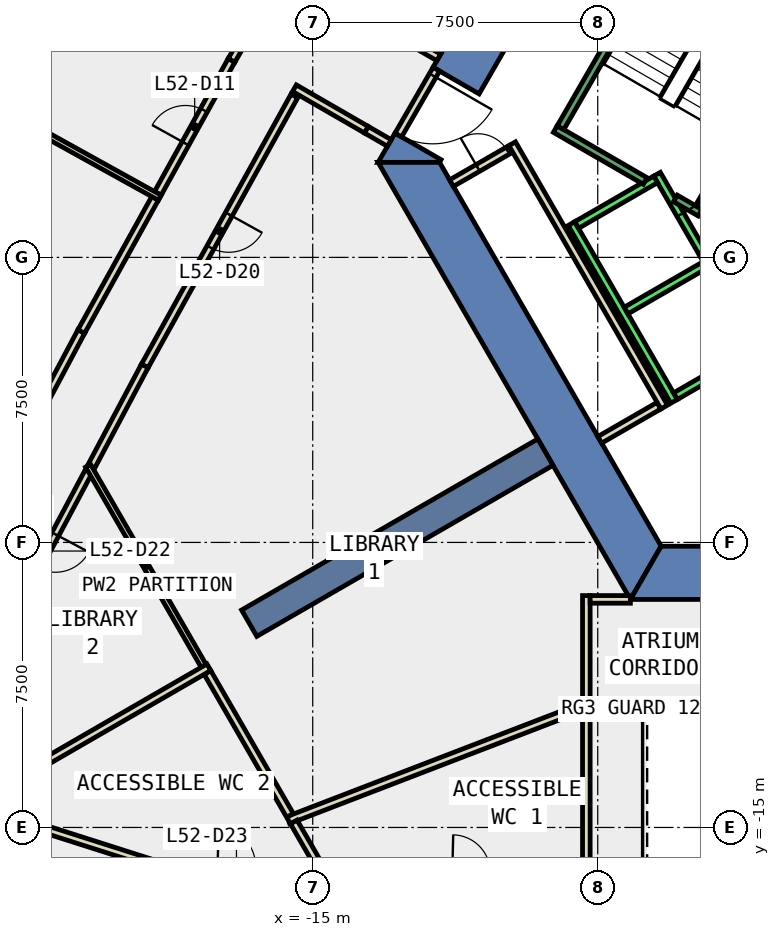
"""IFC4 building model, lengths in metres.
Left out: names, types, materials, properties, quantities, classifications, styles, units other than length and angle.
Written with IfcOpenShell. Run it as: python <this file> out.ifc"""

import sys

from ifc_helpers import new_model, si_unit, direction, frame, frame_2d, origin, place, context, subcontext, project, spatial, polyline, rectangle, outline, extrude, element, fill, save


model = new_model("IFC4")
c1 = context("Model", 3, precision=1e-05, world=origin(), true_north=direction((0.0, 1.0)))
c2 = subcontext(c1, "Body", "Model", "MODEL_VIEW")
j1 = project(units=[si_unit("LENGTHUNIT", "METRE"), si_unit("PLANEANGLEUNIT", "RADIAN")], contexts=[c1])
p1 = place(None, origin())
s1 = spatial("IfcSite", under=j1, at=p1, CompositionType="ELEMENT")
p2 = place(p1, origin())
s2 = spatial("IfcBuilding", under=s1, at=p2, CompositionType="ELEMENT")
p3 = place(p2, frame((0.0, 0.0, 231.8)))
s3 = spatial("IfcBuildingStorey", under=s2, at=p3, CompositionType="ELEMENT", Elevation=231.8)
p4 = place(p3, frame((0.0, 0.0, -0.4)))
e1 = element("IfcWall", 1, at=p4, inside=s3, PredefinedType="SHEAR", context=c2, shape_type="SweptSolid", body=[
    extrude(outline(polyline([(-11.834, 5.002), (-10.622, 4.302), (-5.831, 12.6), (-6.64, 14.0), (-11.834, 5.002)])), origin(), (0.0, 0.0, 1.0), 4.0),
])
p5 = place(p3, frame((0.0, 0.0, -0.4)))
e2 = element("IfcWall", 2, at=p5, inside=s3, PredefinedType="SHEAR", context=c2, shape_type="SweptSolid", body=[
    extrude(outline(polyline([(-11.622, 2.57), (-12.834, 3.27), (-13.279, 2.5), (-11.662, 2.5), (-11.622, 2.57)])), origin(), (0.0, 0.0, 1.0), 4.0),
])
p6 = place(p3, frame((0.0, 0.0, -0.4)))
e3 = element("IfcWall", 3, at=p6, inside=s3, PredefinedType="SHEAR", context=c2, shape_type="SweptSolid", body=[
    extrude(outline(polyline([(-13.279, 2.5), (-6.64, -9.0), (-5.831, -7.6), (-11.662, 2.5), (-13.279, 2.5)])), origin(), (0.0, 0.0, 1.0), 4.0),
])
p7 = place(p3, frame((0.0, 0.0, -0.4)))
e4 = element("IfcWall", 4, at=p7, inside=s3, PredefinedType="SHEAR", context=c2, shape_type="SweptSolid", body=[
    extrude(outline(polyline([(3.75, -9.0), (3.75, -7.6), (-5.831, -7.6), (-6.64, -9.0), (3.75, -9.0)])), origin(), (0.0, 0.0, 1.0), 4.0),
])
p8 = place(p3, frame((-8.877, -5.125, -0.4), z_axis=(0.0, 0.0, 1.0), x_axis=(-0.866017533419, -0.500013631625, 0.0)))
e5 = element("IfcWall", 5, at=p8, inside=s3, PredefinedType="SHEAR", context=c2, shape_type="SweptSolid", body=[
    extrude(rectangle(XDim=9.0, YDim=0.8, at=frame_2d((4.5, 0.0))), origin(), (0.0, 0.0, 1.0), 4.0),
])
p9 = place(p3, frame((-15.482, 4.249, 0.0), z_axis=(0.0, 0.0, 1.0), x_axis=(-0.484683114876, -0.874689818252, 0.0)))
e6 = element("IfcWall", 6, at=p9, inside=s3, PredefinedType="PARTITIONING", context=c2, shape_type="SweptSolid", body=[
    extrude(rectangle(XDim=8.123, YDim=0.2, at=frame_2d((4.062, 0.0))), origin(), (0.0, 0.0, 1.0), 3.6),
])
p10 = place(p9, frame((3.561, 0.0, 0.0)))
e7 = element("IfcOpeningElement", 7, at=p10, cuts=e6, PredefinedType="OPENING", context=c2, shape_type="SweptSolid", body=[
    extrude(rectangle(XDim=1.0, YDim=2.1, at=frame_2d((0.5, 1.05))), frame((0.0, 0.11, 0.0), z_axis=(0.0, -1.0, 0.0), x_axis=(1.0, 0.0, 0.0)), (0.0, 0.0, 1.0), 0.22),
])
p11 = place(p3, frame((-19.419, -2.856, 0.0), z_axis=(0.0, 0.0, 1.0), x_axis=(-0.469627838973, -0.882864481595, 0.0)))
e8 = element("IfcWall", 8, at=p11, inside=s3, PredefinedType="PARTITIONING", context=c2, shape_type="SweptSolid", body=[
    extrude(rectangle(XDim=2.996, YDim=0.2, at=frame_2d((1.498, 0.0))), origin(), (0.0, 0.0, 1.0), 3.6),
])
p12 = place(p3, frame((-12.984, 3.01, 0.0), z_axis=(0.0, 0.0, 1.0), x_axis=(-0.865959057869, 0.500114896893, 0.0)))
e9 = element("IfcWall", 9, at=p12, inside=s3, PredefinedType="PARTITIONING", context=c2, shape_type="SweptSolid", body=[
    extrude(rectangle(XDim=0.7, YDim=0.2, at=frame_2d((0.35, 0.0))), origin(), (0.0, 0.0, 1.0), 2.4),
])
p13 = place(p3, frame((-20.896, -5.634, 0.0), z_axis=(0.0, 0.0, 1.0), x_axis=(-0.469448951755, -0.882959614986, 0.0)))
e10 = element("IfcWall", 10, at=p13, inside=s3, PredefinedType="PARTITIONING", context=c2, shape_type="SweptSolid", body=[
    extrude(rectangle(XDim=4.74, YDim=0.2, at=frame_2d((2.37, 0.0))), origin(), (0.0, 0.0, 1.0), 3.6),
])
p14 = place(p13, frame((1.87, 0.0, 0.0)))
e11 = element("IfcOpeningElement", 11, at=p14, cuts=e10, PredefinedType="OPENING", context=c2, shape_type="SweptSolid", body=[
    extrude(rectangle(XDim=1.0, YDim=2.1, at=frame_2d((0.5, 1.05))), frame((0.0, 0.11, 0.0), z_axis=(0.0, -1.0, 0.0), x_axis=(1.0, 0.0, 0.0)), (0.0, 0.0, 1.0), 0.22),
])
p15 = place(p3, frame((-22.435, -14.92, 0.0), z_axis=(0.0, 0.0, 1.0), x_axis=(0.952831275662, -0.303500510906, 0.0)))
e12 = element("IfcWall", 12, at=p15, inside=s3, PredefinedType="PARTITIONING", context=c2, shape_type="SweptSolid", body=[
    extrude(rectangle(XDim=3.259, YDim=0.2, at=frame_2d((1.629, 0.0))), origin(), (0.0, 0.0, 1.0), 3.6),
])
p16 = place(p3, frame((-19.076, 1.684, 0.0), z_axis=(0.0, 0.0, 1.0), x_axis=(0.484679349661, 0.874691904623, 0.0)))
e13 = element("IfcWall", 13, at=p16, inside=s3, PredefinedType="PARTITIONING", context=c2, shape_type="SweptSolid", body=[
    extrude(rectangle(XDim=4.002, YDim=0.2, at=frame_2d((2.001, 0.0))), origin(), (0.0, 0.0, 1.0), 3.6),
])
p17 = place(p16, frame((1.501, 0.0, 0.0)))
e14 = element("IfcOpeningElement", 14, at=p17, cuts=e13, PredefinedType="OPENING", context=c2, shape_type="SweptSolid", body=[
    extrude(rectangle(XDim=1.0, YDim=2.1, at=frame_2d((0.5, 1.05))), frame((0.0, 0.11, 0.0), z_axis=(0.0, -1.0, 0.0), x_axis=(1.0, 0.0, 0.0)), (0.0, 0.0, 1.0), 0.22),
])
p18 = place(p3, frame((-17.136, 5.185, 0.0), z_axis=(0.0, 0.0, 1.0), x_axis=(0.500102734445, 0.865966081899, 0.0)))
e15 = element("IfcWall", 15, at=p18, inside=s3, PredefinedType="PARTITIONING", context=c2, shape_type="SweptSolid", body=[
    extrude(rectangle(XDim=4.001, YDim=0.2, at=frame_2d((2.0, 0.0))), origin(), (0.0, 0.0, 1.0), 3.6),
])
p19 = place(p3, frame((-24.866, -9.053, 0.0), z_axis=(0.0, 0.0, 1.0), x_axis=(0.469431794586, 0.882968736837, 0.0)))
e16 = element("IfcWall", 16, at=p19, inside=s3, PredefinedType="PARTITIONING", context=c2, shape_type="SweptSolid", body=[
    extrude(rectangle(XDim=8.046, YDim=0.2, at=frame_2d((4.023, 0.0))), origin(), (0.0, 0.0, 1.0), 3.6),
])
p20 = place(p19, frame((3.522, 0.0, 0.0)))
e17 = element("IfcOpeningElement", 17, at=p20, cuts=e16, PredefinedType="OPENING", context=c2, shape_type="SweptSolid", body=[
    extrude(rectangle(XDim=1.0, YDim=2.1, at=frame_2d((0.5, 1.05))), frame((0.0, 0.11, 0.0), z_axis=(0.0, -1.0, 0.0), x_axis=(1.0, 0.0, 0.0)), (0.0, 0.0, 1.0), 0.22),
])
p21 = place(p3, frame((-21.089, -1.949, 0.0), z_axis=(0.0, 0.0, 1.0), x_axis=(0.484622593188, 0.874723351793, 0.0)))
e18 = element("IfcWall", 18, at=p21, inside=s3, PredefinedType="PARTITIONING", context=c2, shape_type="SweptSolid", body=[
    extrude(rectangle(XDim=4.003, YDim=0.2, at=frame_2d((2.002, 0.0))), origin(), (0.0, 0.0, 1.0), 3.6),
])
p22 = place(p3, frame((-5.888, -3.902, 0.0), z_axis=(0.0, 0.0, 1.0), x_axis=(-0.866316547501, -0.499495384889, 0.0)))
e19 = element("IfcWall", 19, at=p22, inside=s3, PredefinedType="PARTITIONING", context=c2, shape_type="SweptSolid", body=[
    extrude(rectangle(XDim=1.8, YDim=0.2, at=frame_2d((0.9, 0.0))), origin(), (0.0, 0.0, 1.0), 3.6),
])
p23 = place(p3, frame((-11.347, 1.954, 0.0), z_axis=(0.0, 0.0, 1.0), x_axis=(0.866282695276, 0.499554093032, 0.0)))
e20 = element("IfcWall", 20, at=p23, inside=s3, PredefinedType="PARTITIONING", context=c2, shape_type="SweptSolid", body=[
    extrude(rectangle(XDim=1.8, YDim=0.2, at=frame_2d((0.9, 0.0))), origin(), (0.0, 0.0, 1.0), 3.6),
])
p24 = place(p23, frame((0.8, 0.0, 0.0)))
e21 = element("IfcOpeningElement", 21, at=p24, cuts=e20, PredefinedType="OPENING", context=c2, shape_type="SweptSolid", body=[
    extrude(rectangle(XDim=0.9, YDim=2.1, at=frame_2d((0.45, 1.05))), frame((0.0, 0.11, 0.0), z_axis=(0.0, -1.0, 0.0), x_axis=(1.0, 0.0, 0.0)), (0.0, 0.0, 1.0), 0.22),
])
p25 = place(p3, frame((-9.751, 2.99, 0.0), z_axis=(0.0, 0.0, 1.0), x_axis=(0.500012163284, -0.866018381195, 0.0)))
e22 = element("IfcWall", 22, at=p25, inside=s3, PredefinedType="PARTITIONING", context=c2, shape_type="SweptSolid", body=[
    extrude(rectangle(XDim=8.0, YDim=0.2, at=frame_2d((4.0, 0.0))), origin(), (0.0, 0.0, 1.0), 3.6),
])
p26 = place(p3, frame((-7.8, -11.69, 0.0), z_axis=(0.0, 0.0, 1.0), x_axis=(0.0, 1.0, 0.0)))
e23 = element("IfcWall", 23, at=p26, inside=s3, PredefinedType="PARTITIONING", context=c2, shape_type="SweptSolid", body=[
    extrude(rectangle(XDim=2.791, YDim=0.2, at=frame_2d((1.396, 0.0))), origin(), (0.0, 0.0, 1.0), 3.6),
])
p27 = place(p3, frame((-7.7, -8.999, 0.0), z_axis=(0.0, 0.0, 1.0), x_axis=(1.0, 0.0, 0.0)))
e24 = element("IfcWall", 24, at=p27, inside=s3, PredefinedType="PARTITIONING", context=c2, shape_type="SweptSolid", body=[
    extrude(rectangle(XDim=1.059, YDim=0.2, at=frame_2d((0.529, 0.0))), origin(), (0.0, 0.0, 1.0), 3.6),
])
p28 = place(p3, frame((-7.8, -16.176, 0.0), z_axis=(0.0, 0.0, 1.0), x_axis=(0.0, 1.0, 0.0)))
e25 = element("IfcWall", 25, at=p28, inside=s3, PredefinedType="PARTITIONING", context=c2, shape_type="SweptSolid", body=[
    extrude(rectangle(XDim=4.286, YDim=0.2, at=frame_2d((2.143, 0.0))), origin(), (0.0, 0.0, 1.0), 3.6),
])
p29 = place(p3, frame((-7.707, -11.755, 0.0), z_axis=(0.0, 0.0, 1.0), x_axis=(-0.933420343818, -0.358784701105, 0.0)))
e26 = element("IfcWall", 26, at=p29, inside=s3, PredefinedType="PARTITIONING", context=c2, shape_type="SweptSolid", body=[
    extrude(rectangle(XDim=8.501, YDim=0.2, at=frame_2d((4.25, 0.0))), origin(), (0.0, 0.0, 1.0), 3.6),
])
p30 = place(p3, frame((-17.87, -10.749, 0.0), z_axis=(0.0, 0.0, 1.0), x_axis=(-0.499907758807, 0.866078652713, 0.0)))
e27 = element("IfcWall", 27, at=p30, inside=s3, PredefinedType="PARTITIONING", context=c2, shape_type="SweptSolid", body=[
    extrude(rectangle(XDim=6.083, YDim=0.15, at=frame_2d((3.042, 0.0))), origin(), (0.0, 0.0, 1.0), 3.6),
])
p31 = place(p3, frame((-15.599, -14.682, 0.0), z_axis=(0.0, 0.0, 1.0), x_axis=(-0.500033987016, 0.866005780482, 0.0)))
e28 = element("IfcWall", 28, at=p31, inside=s3, PredefinedType="PARTITIONING", context=c2, shape_type="SweptSolid", body=[
    extrude(rectangle(XDim=4.342, YDim=0.2, at=frame_2d((2.171, 0.0))), origin(), (0.0, 0.0, 1.0), 3.6),
])
p32 = place(p3, frame((-14.778, -16.103, 0.0), z_axis=(0.0, 0.0, 1.0), x_axis=(-0.500495009846, 0.865739421027, 0.0)))
e29 = element("IfcWall", 29, at=p32, inside=s3, PredefinedType="PARTITIONING", context=c2, shape_type="SweptSolid", body=[
    extrude(rectangle(XDim=1.44, YDim=0.2, at=frame_2d((0.72, 0.0))), origin(), (0.0, 0.0, 1.0), 3.6),
])
p33 = place(p3, frame((-17.733, -10.785, 0.0), z_axis=(0.0, 0.0, 1.0), x_axis=(-0.865978611197, -0.500081038382, 0.0)))
e30 = element("IfcWall", 30, at=p33, inside=s3, PredefinedType="PARTITIONING", context=c2, shape_type="SweptSolid", body=[
    extrude(rectangle(XDim=6.581, YDim=0.2, at=frame_2d((3.291, 0.0))), origin(), (0.0, 0.0, 1.0), 3.6),
])
p34 = place(p3, frame((-19.025, 1.57, 0.0), z_axis=(0.0, 0.0, 1.0), x_axis=(-0.874714019242, 0.484639437666, 0.0)))
e31 = element("IfcWall", 31, at=p34, inside=s3, PredefinedType="PARTITIONING", context=c2, shape_type="SweptSolid", body=[
    extrude(rectangle(XDim=5.6, YDim=0.15, at=frame_2d((2.8, 0.0))), origin(), (0.0, 0.0, 1.0), 3.6),
])
p35 = place(p3, frame((-11.747, 4.952, 0.0), z_axis=(0.0, 0.0, 1.0), x_axis=(-0.50002537861, -0.866010750942, 0.0)))
e32 = element("IfcWall", 32, at=p35, inside=s3, PredefinedType="PARTITIONING", context=c2, shape_type="SweptSolid", body=[
    extrude(rectangle(XDim=2.0, YDim=0.2, at=frame_2d((1.0, 0.0))), origin(), (0.0, 0.0, 1.0), 2.4),
])
p36 = place(p35, frame((0.19, 0.0, 0.0)))
e33 = element("IfcOpeningElement", 33, at=p36, cuts=e32, PredefinedType="OPENING", context=c2, shape_type="SweptSolid", body=[
    extrude(rectangle(XDim=1.8, YDim=2.1, at=frame_2d((0.9, 1.05))), frame((0.0, 0.11, 0.0), z_axis=(0.0, -1.0, 0.0), x_axis=(1.0, 0.0, 0.0)), (0.0, 0.0, 1.0), 0.22),
])
p37 = place(p3, frame((-12.29, 5.612, 0.0), z_axis=(0.0, 0.0, 1.0), x_axis=(0.865871789474, -0.500265973451, 0.0)))
e34 = element("IfcWall", 34, at=p37, inside=s3, PredefinedType="PARTITIONING", context=c2, shape_type="SweptSolid", body=[
    extrude(rectangle(XDim=0.7, YDim=0.2, at=frame_2d((0.35, 0.0))), origin(), (0.0, 0.0, 1.0), 2.4),
])
p38 = place(p3, frame((-13.59, 3.36, 0.0), z_axis=(0.0, 0.0, 1.0), x_axis=(-0.866004963011, 0.500035402787, 0.0)))
e35 = element("IfcWall", 35, at=p38, inside=s3, PredefinedType="PARTITIONING", context=c2, shape_type="SweptSolid", body=[
    extrude(rectangle(XDim=2.183, YDim=0.2, at=frame_2d((1.092, 0.0))), origin(), (0.0, 0.0, 1.0), 3.6),
])
p39 = place(p3, frame((-5.94, 2.188, 0.0), z_axis=(0.0, 0.0, 1.0), x_axis=(0.500034260056, -0.866005622828, 0.0)))
e36 = element("IfcWall", 36, at=p39, inside=s3, PredefinedType="STANDARD", context=c2, shape_type="SweptSolid", body=[
    extrude(rectangle(XDim=5.399, YDim=0.2, at=frame_2d((2.7, 0.0))), origin(), (0.0, 0.0, 1.0), 3.6),
])
p40 = place(p39, frame((3.075, 0.0, 0.0)))
e37 = element("IfcOpeningElement", 37, at=p40, cuts=e36, PredefinedType="OPENING", context=c2, shape_type="SweptSolid", body=[
    extrude(rectangle(XDim=1.1, YDim=2.1, at=frame_2d((0.55, 1.05))), frame((0.0, 0.11, 0.0), z_axis=(0.0, -1.0, 0.0), x_axis=(1.0, 0.0, 0.0)), (0.0, 0.0, 1.0), 0.22),
])
p41 = place(p39, frame((1.225, 0.0, 0.0)))
e38 = element("IfcOpeningElement", 38, at=p41, cuts=e36, PredefinedType="OPENING", context=c2, shape_type="SweptSolid", body=[
    extrude(rectangle(XDim=1.1, YDim=2.1, at=frame_2d((0.55, 1.05))), frame((0.0, 0.11, 0.0), z_axis=(0.0, -1.0, 0.0), x_axis=(1.0, 0.0, 0.0)), (0.0, 0.0, 1.0), 0.22),
])
p42 = place(p3, frame((-8.192, 0.888, 0.0), z_axis=(0.0, 0.0, 1.0), x_axis=(0.500034260056, -0.866005622828, 0.0)))
e39 = element("IfcWall", 39, at=p42, inside=s3, PredefinedType="STANDARD", context=c2, shape_type="SweptSolid", body=[
    extrude(rectangle(XDim=5.399, YDim=0.2, at=frame_2d((2.7, 0.0))), origin(), (0.0, 0.0, 1.0), 3.6),
])
for number, where, z_axis, x_axis in (
    (40, (-5.977, 2.052, 0.0), (0.0, 0.0, 1.0), (-0.866, -0.5, 0.0)),
    (41, (-4.677, -0.2, 0.0), (0.0, 0.0, 1.0), (-0.866, -0.5, 0.0)),
):
    element("IfcWall", number, at=place(p3, frame(where, z_axis=z_axis, x_axis=x_axis)), inside=s3, PredefinedType="STANDARD", context=c2, shape_type="SweptSolid", body=[
        extrude(rectangle(XDim=2.399, YDim=0.2, at=frame_2d((1.2, 0.0))), origin(), (0.0, 0.0, 1.0), 3.6),
    ])
p43 = place(p3, frame((-3.377, -2.452, 0.0), z_axis=(0.0, 0.0, 1.0), x_axis=(-0.865955154139, -0.50012165622, 0.0)))
e42 = element("IfcWall", 42, at=p43, inside=s3, PredefinedType="STANDARD", context=c2, shape_type="SweptSolid", body=[
    extrude(rectangle(XDim=2.4, YDim=0.2, at=frame_2d((1.2, 0.0))), origin(), (0.0, 0.0, 1.0), 3.6),
])
p44 = place(p3, frame((-6.25, 2.01, 0.0), z_axis=(0.0, 0.0, 1.0), x_axis=(-0.86611865017, 0.499838457731, 0.0)))
e43 = element("IfcWall", 43, at=p44, inside=s3, PredefinedType="STANDARD", context=c2, shape_type="SweptSolid", body=[
    extrude(rectangle(XDim=2.733, YDim=0.2, at=frame_2d((1.366, 0.0))), origin(), (0.0, 0.0, 1.0), 3.6),
])
p45 = place(p3, frame((-4.806, 1.176, 0.0), z_axis=(0.0, 0.0, 1.0), x_axis=(-0.866558586415, 0.499075361355, 0.0)))
e44 = element("IfcWall", 44, at=p45, inside=s3, PredefinedType="STANDARD", context=c2, shape_type="SweptSolid", body=[
    extrude(rectangle(XDim=0.751, YDim=0.2, at=frame_2d((0.376, 0.0))), origin(), (0.0, 0.0, 1.0), 3.6),
])
p46 = place(p3, frame((-1.393, 7.288, 0.0), z_axis=(0.0, 0.0, 1.0), x_axis=(-0.499963383562, -0.866046543262, 0.0)))
e45 = element("IfcWall", 45, at=p46, inside=s3, PredefinedType="STANDARD", context=c2, shape_type="SweptSolid", body=[
    extrude(rectangle(XDim=6.9, YDim=0.2, at=frame_2d((3.45, 0.0))), origin(), (0.0, 0.0, 1.0), 3.6),
])
p47 = place(p46, frame((0.45, 0.0, 0.0)))
e46 = element("IfcOpeningElement", 46, at=p47, cuts=e45, PredefinedType="OPENING", context=c2, shape_type="SweptSolid", body=[
    extrude(rectangle(XDim=1.1, YDim=2.2, at=frame_2d((0.55, 1.1))), frame((0.0, 0.11, 0.0), z_axis=(0.0, -1.0, 0.0), x_axis=(1.0, 0.0, 0.0)), (0.0, 0.0, 1.0), 0.22),
])
p48 = place(p3, frame((-5.03, 9.388, 0.0), z_axis=(0.0, 0.0, 1.0), x_axis=(-0.499978703459, -0.866037698999, 0.0)))
e47 = element("IfcWall", 47, at=p48, inside=s3, PredefinedType="STANDARD", context=c2, shape_type="SweptSolid", body=[
    extrude(rectangle(XDim=6.9, YDim=0.2, at=frame_2d((3.45, 0.0))), origin(), (0.0, 0.0, 1.0), 3.6),
])
p49 = place(p17, origin())
e48 = element("IfcDoor", 48, at=p49, inside=s3, OperationType="SINGLE_SWING_LEFT", PredefinedType="DOOR", context=c2, shape_type="SweptSolid", body=[
    extrude(rectangle(XDim=1.0, YDim=2.1, at=frame_2d((0.5, 1.05))), frame((0.0, 0.025, 0.0), z_axis=(0.0, -1.0, 0.0), x_axis=(1.0, 0.0, 0.0)), (0.0, 0.0, 1.0), 0.05),
])
fill(e14, e48)
p50 = place(p10, origin())
e49 = element("IfcDoor", 49, at=p50, inside=s3, OperationType="SINGLE_SWING_LEFT", PredefinedType="DOOR", context=c2, shape_type="SweptSolid", body=[
    extrude(rectangle(XDim=1.0, YDim=2.1, at=frame_2d((0.5, 1.05))), frame((0.0, 0.025, 0.0), z_axis=(0.0, -1.0, 0.0), x_axis=(1.0, 0.0, 0.0)), (0.0, 0.0, 1.0), 0.05),
])
fill(e7, e49)
p51 = place(p14, origin())
e50 = element("IfcDoor", 50, at=p51, inside=s3, OperationType="SINGLE_SWING_LEFT", PredefinedType="DOOR", context=c2, shape_type="SweptSolid", body=[
    extrude(rectangle(XDim=1.0, YDim=2.1, at=frame_2d((0.5, 1.05))), frame((0.0, 0.025, 0.0), z_axis=(0.0, -1.0, 0.0), x_axis=(1.0, 0.0, 0.0)), (0.0, 0.0, 1.0), 0.05),
])
fill(e11, e50)
p52 = place(p24, origin())
e51 = element("IfcDoor", 51, at=p52, inside=s3, OperationType="SINGLE_SWING_LEFT", PredefinedType="DOOR", context=c2, shape_type="SweptSolid", body=[
    extrude(rectangle(XDim=0.9, YDim=2.1, at=frame_2d((0.45, 1.05))), frame((0.0, 0.025, 0.0), z_axis=(0.0, -1.0, 0.0), x_axis=(1.0, 0.0, 0.0)), (0.0, 0.0, 1.0), 0.05),
])
fill(e21, e51)
p53 = place(p36, origin())
e52 = element("IfcDoor", 52, at=p53, inside=s3, OperationType="DOUBLE_DOOR_SINGLE_SWING", PredefinedType="DOOR", context=c2, shape_type="SweptSolid", body=[
    extrude(rectangle(XDim=1.8, YDim=2.1, at=frame_2d((0.9, 1.05))), frame((0.0, 0.025, 0.0), z_axis=(0.0, -1.0, 0.0), x_axis=(1.0, 0.0, 0.0)), (0.0, 0.0, 1.0), 0.05),
])
fill(e33, e52)
p54 = place(p41, origin())
e53 = element("IfcDoor", 53, at=p54, inside=s3, OperationType="SLIDING_TO_LEFT", PredefinedType="DOOR", context=c2, shape_type="SweptSolid", body=[
    extrude(rectangle(XDim=1.1, YDim=2.1, at=frame_2d((0.55, 1.05))), frame((0.0, 0.025, 0.0), z_axis=(0.0, -1.0, 0.0), x_axis=(1.0, 0.0, 0.0)), (0.0, 0.0, 1.0), 0.05),
])
fill(e38, e53)
save(model, sys.argv[1])
